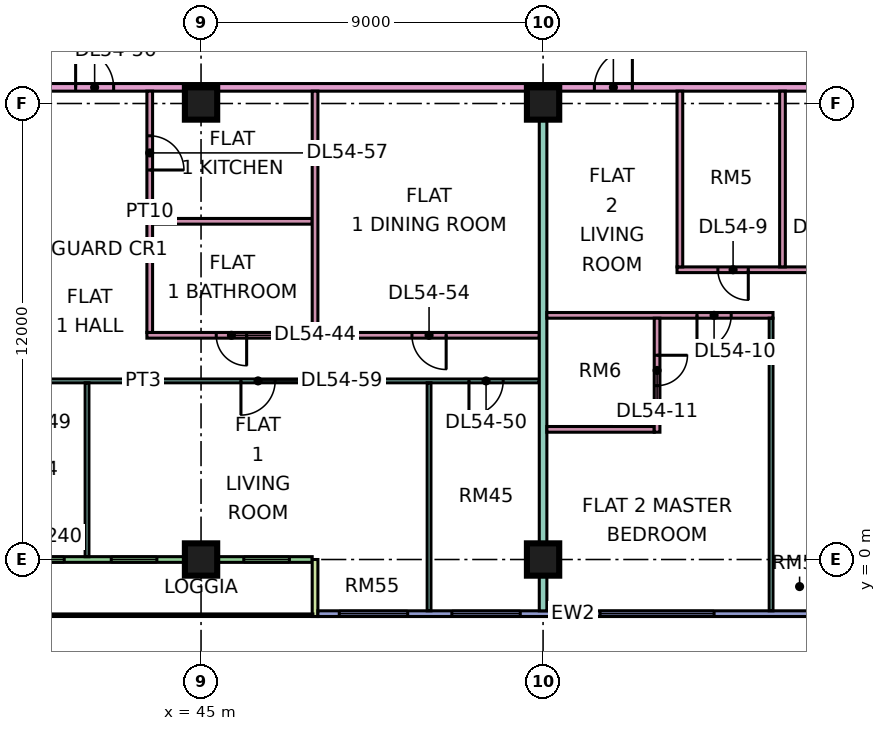
"""IFC4 building model, lengths in metres.
Left out: names, types, materials, properties, quantities, classifications, styles, units other than length and angle.
Written with IfcOpenShell. Run it as: python <this file> out.ifc"""

import sys

from ifc_helpers import new_model, si_unit, direction, frame, frame_2d, origin, origin_2d, place, context, subcontext, project, spatial, rectangle, extrude, element, fill, save


model = new_model("IFC4")
c1 = context("Model", 3, precision=1e-05, world=origin(), true_north=direction((0.0, 1.0)))
c2 = subcontext(c1, "Body", "Model", "MODEL_VIEW")
j1 = project(units=[si_unit("LENGTHUNIT", "METRE"), si_unit("PLANEANGLEUNIT", "RADIAN")], contexts=[c1])
p1 = place(None, origin())
s1 = spatial("IfcSite", under=j1, at=p1, CompositionType="ELEMENT")
p2 = place(p1, origin())
s2 = spatial("IfcBuilding", under=s1, at=p2, CompositionType="ELEMENT")
p3 = place(p2, frame((0.0, 0.0, 230.4)))
s3 = spatial("IfcBuildingStorey", under=s2, at=p3, CompositionType="ELEMENT", Elevation=230.4)
for number, where, z_axis, x_axis in (
    (1, (45.0, 0.0, 0.0), (0.0, 0.0, 1.0), (1.0, 0.0, 0.0)),
    (2, (45.0, 12.0, 0.0), (0.0, 0.0, 1.0), (1.0, 0.0, 0.0)),
    (3, (54.0, 0.0, 0.0), (0.0, 0.0, 1.0), (1.0, 0.0, 0.0)),
    (4, (54.0, 12.0, 0.0), (0.0, 0.0, 1.0), (1.0, 0.0, 0.0)),
):
    element("IfcColumn", number, at=place(p3, frame(where, z_axis=z_axis, x_axis=x_axis)), inside=s3, PredefinedType="COLUMN", context=c2, shape_type="SweptSolid", body=[
        extrude(rectangle(XDim=0.85, YDim=0.85, at=origin_2d()), origin(), (0.0, 0.0, 1.0), 3.75),
    ])
p4 = place(p3, frame((36.075, 0.0, 0.0), z_axis=(0.0, 0.0, 1.0), x_axis=(1.0, 0.0, 0.0)))
e5 = element("IfcWall", 5, at=p4, inside=s3, PredefinedType="SOLIDWALL", context=c2, shape_type="SweptSolid", body=[
    extrude(rectangle(XDim=11.85, YDim=0.15, at=frame_2d((5.925, 0.0))), origin(), (0.0, 0.0, 1.0), 3.35),
])
p5 = place(p4, frame((1.087, 0.0, 0.0)))
e6 = element("IfcOpeningElement", 6, at=p5, cuts=e5, PredefinedType="OPENING", context=c2, shape_type="SweptSolid", body=[
    extrude(rectangle(XDim=1.2, YDim=2.4, at=frame_2d((0.6, 1.2))), frame((0.0, 0.085, 0.0), z_axis=(0.0, -1.0, 0.0), x_axis=(1.0, 0.0, 0.0)), (0.0, 0.0, 1.0), 0.17),
])
p6 = place(p4, frame((3.525, 0.0, 0.45)))
e7 = element("IfcOpeningElement", 7, at=p6, cuts=e5, PredefinedType="OPENING", context=c2, shape_type="SweptSolid", body=[
    extrude(rectangle(XDim=1.8, YDim=2.4, at=frame_2d((0.9, 1.2))), frame((0.0, 0.085, 0.0), z_axis=(0.0, -1.0, 0.0), x_axis=(1.0, 0.0, 0.0)), (0.0, 0.0, 1.0), 0.17),
])
p7 = place(p4, frame((6.562, 0.0, 0.45)))
e8 = element("IfcOpeningElement", 8, at=p7, cuts=e5, PredefinedType="OPENING", context=c2, shape_type="SweptSolid", body=[
    extrude(rectangle(XDim=1.2, YDim=2.4, at=frame_2d((0.6, 1.2))), frame((0.0, 0.085, 0.0), z_axis=(0.0, -1.0, 0.0), x_axis=(1.0, 0.0, 0.0)), (0.0, 0.0, 1.0), 0.17),
])
p8 = place(p4, frame((10.05, 0.0, 0.45)))
e9 = element("IfcOpeningElement", 9, at=p8, cuts=e5, PredefinedType="OPENING", context=c2, shape_type="SweptSolid", body=[
    extrude(rectangle(XDim=1.2, YDim=2.4, at=frame_2d((0.6, 1.2))), frame((0.0, 0.085, 0.0), z_axis=(0.0, -1.0, 0.0), x_axis=(1.0, 0.0, 0.0)), (0.0, 0.0, 1.0), 0.17),
])
p9 = place(p3, frame((48.0, -1.5, 0.0), z_axis=(0.0, 0.0, 1.0), x_axis=(0.0, 1.0, 0.0)))
e10 = element("IfcWall", 10, at=p9, inside=s3, PredefinedType="SOLIDWALL", context=c2, shape_type="SweptSolid", body=[
    extrude(rectangle(XDim=1.5, YDim=0.15, at=frame_2d((0.75, 0.0))), origin(), (0.0, 0.0, 1.0), 3.35),
])
p10 = place(p3, frame((48.075, -1.425, 0.0), z_axis=(0.0, 0.0, 1.0), x_axis=(1.0, 0.0, 0.0)))
e11 = element("IfcWall", 11, at=p10, inside=s3, PredefinedType="SOLIDWALL", context=c2, shape_type="SweptSolid", body=[
    extrude(rectangle(XDim=13.425, YDim=0.15, at=frame_2d((6.712, 0.0))), origin(), (0.0, 0.0, 1.0), 3.35),
])
p11 = place(p10, frame((0.562, 0.0, 0.45)))
e12 = element("IfcOpeningElement", 12, at=p11, cuts=e11, PredefinedType="OPENING", context=c2, shape_type="SweptSolid", body=[
    extrude(rectangle(XDim=1.8, YDim=2.4, at=frame_2d((0.9, 1.2))), frame((0.0, 0.085, 0.0), z_axis=(0.0, -1.0, 0.0), x_axis=(1.0, 0.0, 0.0)), (0.0, 0.0, 1.0), 0.17),
])
p12 = place(p10, frame((3.525, 0.0, 0.45)))
e13 = element("IfcOpeningElement", 13, at=p12, cuts=e11, PredefinedType="OPENING", context=c2, shape_type="SweptSolid", body=[
    extrude(rectangle(XDim=1.8, YDim=2.4, at=frame_2d((0.9, 1.2))), frame((0.0, 0.085, 0.0), z_axis=(0.0, -1.0, 0.0), x_axis=(1.0, 0.0, 0.0)), (0.0, 0.0, 1.0), 0.17),
])
p13 = place(p10, frame((7.425, 0.0, 0.45)))
e14 = element("IfcOpeningElement", 14, at=p13, cuts=e11, PredefinedType="OPENING", context=c2, shape_type="SweptSolid", body=[
    extrude(rectangle(XDim=3.0, YDim=2.4, at=frame_2d((1.5, 1.2))), frame((0.0, 0.085, 0.0), z_axis=(0.0, -1.0, 0.0), x_axis=(1.0, 0.0, 0.0)), (0.0, 0.0, 1.0), 0.17),
])
p14 = place(p3, frame((33.05, 4.7, 0.0), z_axis=(0.0, 0.0, 1.0), x_axis=(1.0, 0.0, 0.0)))
e15 = element("IfcWall", 15, at=p14, inside=s3, PredefinedType="PARTITIONING", context=c2, shape_type="SweptSolid", body=[
    extrude(rectangle(XDim=20.85, YDim=0.1, at=frame_2d((10.425, 0.0))), origin(), (0.0, 0.0, 1.0), 3.35),
])
p15 = place(p14, frame((1.0, 0.0, 0.0)))
e16 = element("IfcOpeningElement", 16, at=p15, cuts=e15, PredefinedType="OPENING", context=c2, shape_type="SweptSolid", body=[
    extrude(rectangle(XDim=0.9, YDim=2.1, at=frame_2d((0.45, 1.05))), frame((0.0, 0.06, 0.0), z_axis=(0.0, -1.0, 0.0), x_axis=(1.0, 0.0, 0.0)), (0.0, 0.0, 1.0), 0.12),
])
p16 = place(p14, frame((4.0, 0.0, 0.0)))
e17 = element("IfcOpeningElement", 17, at=p16, cuts=e15, PredefinedType="OPENING", context=c2, shape_type="SweptSolid", body=[
    extrude(rectangle(XDim=0.9, YDim=2.1, at=frame_2d((0.45, 1.05))), frame((0.0, 0.06, 0.0), z_axis=(0.0, -1.0, 0.0), x_axis=(1.0, 0.0, 0.0)), (0.0, 0.0, 1.0), 0.12),
])
p17 = place(p14, frame((7.0, 0.0, 0.0)))
e18 = element("IfcOpeningElement", 18, at=p17, cuts=e15, PredefinedType="OPENING", context=c2, shape_type="SweptSolid", body=[
    extrude(rectangle(XDim=0.9, YDim=2.1, at=frame_2d((0.45, 1.05))), frame((0.0, 0.06, 0.0), z_axis=(0.0, -1.0, 0.0), x_axis=(1.0, 0.0, 0.0)), (0.0, 0.0, 1.0), 0.12),
])
p18 = place(p14, frame((19.0, 0.0, 0.0)))
e19 = element("IfcOpeningElement", 19, at=p18, cuts=e15, PredefinedType="OPENING", context=c2, shape_type="SweptSolid", body=[
    extrude(rectangle(XDim=0.9, YDim=2.1, at=frame_2d((0.45, 1.05))), frame((0.0, 0.06, 0.0), z_axis=(0.0, -1.0, 0.0), x_axis=(1.0, 0.0, 0.0)), (0.0, 0.0, 1.0), 0.12),
])
p19 = place(p14, frame((13.0, 0.0, 0.0)))
e20 = element("IfcOpeningElement", 20, at=p19, cuts=e15, PredefinedType="OPENING", context=c2, shape_type="SweptSolid", body=[
    extrude(rectangle(XDim=0.9, YDim=2.1, at=frame_2d((0.45, 1.05))), frame((0.0, 0.06, 0.0), z_axis=(0.0, -1.0, 0.0), x_axis=(1.0, 0.0, 0.0)), (0.0, 0.0, 1.0), 0.12),
])
p20 = place(p3, frame((40.65, 12.425, 0.0), z_axis=(0.0, 0.0, 1.0), x_axis=(1.0, 0.0, 0.0)))
e21 = element("IfcWall", 21, at=p20, inside=s3, PredefinedType="PARTITIONING", context=c2, shape_type="SweptSolid", body=[
    extrude(rectangle(XDim=22.276, YDim=0.2, at=frame_2d((11.138, 0.0))), origin(), (0.0, 0.0, 1.0), 3.35),
])
p21 = place(p20, frame((14.7, 0.0, 0.0)))
e22 = element("IfcOpeningElement", 22, at=p21, cuts=e21, PredefinedType="OPENING", context=c2, shape_type="SweptSolid", body=[
    extrude(rectangle(XDim=1.0, YDim=2.1, at=frame_2d((0.5, 1.05))), frame((0.0, 0.11, 0.0), z_axis=(0.0, -1.0, 0.0), x_axis=(1.0, 0.0, 0.0)), (0.0, 0.0, 1.0), 0.22),
])
p22 = place(p20, frame((1.05, 0.0, 0.0)))
e23 = element("IfcOpeningElement", 23, at=p22, cuts=e21, PredefinedType="OPENING", context=c2, shape_type="SweptSolid", body=[
    extrude(rectangle(XDim=1.0, YDim=2.1, at=frame_2d((0.5, 1.05))), frame((0.0, 0.11, 0.0), z_axis=(0.0, -1.0, 0.0), x_axis=(1.0, 0.0, 0.0)), (0.0, 0.0, 1.0), 0.22),
])
p23 = place(p3, frame((42.0, 0.074, 0.0), z_axis=(0.0, 0.0, 1.0), x_axis=(0.0, 1.0, 0.0)))
e24 = element("IfcWall", 24, at=p23, inside=s3, PredefinedType="PARTITIONING", context=c2, shape_type="SweptSolid", body=[
    extrude(rectangle(XDim=4.576, YDim=0.1, at=frame_2d((2.288, 0.0))), origin(), (0.0, 0.0, 1.0), 3.35),
])
p24 = place(p3, frame((43.575, 5.9, 0.0), z_axis=(0.0, 0.0, 1.0), x_axis=(1.0, 0.0, 0.0)))
e25 = element("IfcWall", 25, at=p24, inside=s3, PredefinedType="PARTITIONING", context=c2, shape_type="SweptSolid", body=[
    extrude(rectangle(XDim=10.325, YDim=0.15, at=frame_2d((5.163, 0.0))), origin(), (0.0, 0.0, 1.0), 3.35),
])
p25 = place(p24, frame((1.825, 0.0, 0.0)))
e26 = element("IfcOpeningElement", 26, at=p25, cuts=e25, PredefinedType="OPENING", context=c2, shape_type="SweptSolid", body=[
    extrude(rectangle(XDim=0.8, YDim=2.1, at=frame_2d((0.4, 1.05))), frame((0.0, 0.085, 0.0), z_axis=(0.0, -1.0, 0.0), x_axis=(1.0, 0.0, 0.0)), (0.0, 0.0, 1.0), 0.17),
])
p26 = place(p24, frame((6.975, 0.0, 0.0)))
e27 = element("IfcOpeningElement", 27, at=p26, cuts=e25, PredefinedType="OPENING", context=c2, shape_type="SweptSolid", body=[
    extrude(rectangle(XDim=0.9, YDim=2.1, at=frame_2d((0.45, 1.05))), frame((0.0, 0.085, 0.0), z_axis=(0.0, -1.0, 0.0), x_axis=(1.0, 0.0, 0.0)), (0.0, 0.0, 1.0), 0.17),
])
p27 = place(p3, frame((43.65, 5.975, 0.0), z_axis=(0.0, 0.0, 1.0), x_axis=(0.0, 1.0, 0.0)))
e28 = element("IfcWall", 28, at=p27, inside=s3, PredefinedType="PARTITIONING", context=c2, shape_type="SweptSolid", body=[
    extrude(rectangle(XDim=6.35, YDim=0.15, at=frame_2d((3.175, 0.0))), origin(), (0.0, 0.0, 1.0), 3.35),
])
p28 = place(p27, frame((4.275, 0.0, 0.0)))
e29 = element("IfcOpeningElement", 29, at=p28, cuts=e28, PredefinedType="OPENING", context=c2, shape_type="SweptSolid", body=[
    extrude(rectangle(XDim=0.9, YDim=2.1, at=frame_2d((0.45, 1.05))), frame((0.0, 0.085, 0.0), z_axis=(0.0, -1.0, 0.0), x_axis=(1.0, 0.0, 0.0)), (0.0, 0.0, 1.0), 0.17),
])
p29 = place(p3, frame((43.725, 8.9, 0.0), z_axis=(0.0, 0.0, 1.0), x_axis=(1.0, 0.0, 0.0)))
e30 = element("IfcWall", 30, at=p29, inside=s3, PredefinedType="PARTITIONING", context=c2, shape_type="SweptSolid", body=[
    extrude(rectangle(XDim=4.2, YDim=0.15, at=frame_2d((2.1, 0.0))), origin(), (0.0, 0.0, 1.0), 3.35),
])
p30 = place(p3, frame((48.0, 5.975, 0.0), z_axis=(0.0, 0.0, 1.0), x_axis=(0.0, 1.0, 0.0)))
e31 = element("IfcWall", 31, at=p30, inside=s3, PredefinedType="PARTITIONING", context=c2, shape_type="SweptSolid", body=[
    extrude(rectangle(XDim=6.35, YDim=0.15, at=frame_2d((3.175, 0.0))), origin(), (0.0, 0.0, 1.0), 3.35),
])
p31 = place(p3, frame((51.0, -1.35, 0.0), z_axis=(0.0, 0.0, 1.0), x_axis=(0.0, 1.0, 0.0)))
e32 = element("IfcWall", 32, at=p31, inside=s3, PredefinedType="PARTITIONING", context=c2, shape_type="SweptSolid", body=[
    extrude(rectangle(XDim=6.0, YDim=0.1, at=frame_2d((3.0, 0.0))), origin(), (0.0, 0.0, 1.0), 3.35),
])
p32 = place(p3, frame((54.0, -1.351, 0.0), z_axis=(0.0, 0.0, 1.0), x_axis=(0.0, 1.0, 0.0)))
e33 = element("IfcWall", 33, at=p32, inside=s3, PredefinedType="PARTITIONING", context=c2, shape_type="SweptSolid", body=[
    extrude(rectangle(XDim=13.676, YDim=0.2, at=frame_2d((6.838, 0.0))), origin(), (0.0, 0.0, 1.0), 3.35),
])
p33 = place(p3, frame((54.1, 3.425, 0.0), z_axis=(0.0, 0.0, 1.0), x_axis=(1.0, 0.0, 0.0)))
e34 = element("IfcWall", 34, at=p33, inside=s3, PredefinedType="PARTITIONING", context=c2, shape_type="SweptSolid", body=[
    extrude(rectangle(XDim=2.825, YDim=0.15, at=frame_2d((1.413, 0.0))), origin(), (0.0, 0.0, 1.0), 3.35),
])
p34 = place(p3, frame((54.1, 6.425, 0.0), z_axis=(0.0, 0.0, 1.0), x_axis=(1.0, 0.0, 0.0)))
e35 = element("IfcWall", 35, at=p34, inside=s3, PredefinedType="PARTITIONING", context=c2, shape_type="SweptSolid", body=[
    extrude(rectangle(XDim=5.95, YDim=0.15, at=frame_2d((2.975, 0.0))), origin(), (0.0, 0.0, 1.0), 3.35),
])
p35 = place(p34, frame((3.95, 0.0, 0.0)))
e36 = element("IfcOpeningElement", 36, at=p35, cuts=e35, PredefinedType="OPENING", context=c2, shape_type="SweptSolid", body=[
    extrude(rectangle(XDim=0.9, YDim=2.1, at=frame_2d((0.45, 1.05))), frame((0.0, 0.085, 0.0), z_axis=(0.0, -1.0, 0.0), x_axis=(1.0, 0.0, 0.0)), (0.0, 0.0, 1.0), 0.17),
])
p36 = place(p3, frame((57.0, 3.35, 0.0), z_axis=(0.0, 0.0, 1.0), x_axis=(0.0, 1.0, 0.0)))
e37 = element("IfcWall", 37, at=p36, inside=s3, PredefinedType="PARTITIONING", context=c2, shape_type="SweptSolid", body=[
    extrude(rectangle(XDim=3.0, YDim=0.15, at=frame_2d((1.5, 0.0))), origin(), (0.0, 0.0, 1.0), 3.35),
])
p37 = place(p36, frame((1.225, 0.0, 0.0)))
e38 = element("IfcOpeningElement", 38, at=p37, cuts=e37, PredefinedType="OPENING", context=c2, shape_type="SweptSolid", body=[
    extrude(rectangle(XDim=0.8, YDim=2.1, at=frame_2d((0.4, 1.05))), frame((0.0, 0.085, 0.0), z_axis=(0.0, -1.0, 0.0), x_axis=(1.0, 0.0, 0.0)), (0.0, 0.0, 1.0), 0.17),
])
p38 = place(p3, frame((57.525, 7.625, 0.0), z_axis=(0.0, 0.0, 1.0), x_axis=(1.0, 0.0, 0.0)))
e39 = element("IfcWall", 39, at=p38, inside=s3, PredefinedType="PARTITIONING", context=c2, shape_type="SweptSolid", body=[
    extrude(rectangle(XDim=6.825, YDim=0.15, at=frame_2d((3.413, 0.0))), origin(), (0.0, 0.0, 1.0), 3.35),
])
p39 = place(p38, frame((1.075, 0.0, 0.0)))
e40 = element("IfcOpeningElement", 40, at=p39, cuts=e39, PredefinedType="OPENING", context=c2, shape_type="SweptSolid", body=[
    extrude(rectangle(XDim=0.8, YDim=2.1, at=frame_2d((0.4, 1.05))), frame((0.0, 0.085, 0.0), z_axis=(0.0, -1.0, 0.0), x_axis=(1.0, 0.0, 0.0)), (0.0, 0.0, 1.0), 0.17),
])
p40 = place(p38, frame((3.675, 0.0, 0.0)))
e41 = element("IfcOpeningElement", 41, at=p40, cuts=e39, PredefinedType="OPENING", context=c2, shape_type="SweptSolid", body=[
    extrude(rectangle(XDim=0.9, YDim=2.1, at=frame_2d((0.45, 1.05))), frame((0.0, 0.085, 0.0), z_axis=(0.0, -1.0, 0.0), x_axis=(1.0, 0.0, 0.0)), (0.0, 0.0, 1.0), 0.17),
])
p41 = place(p3, frame((57.6, 7.7, 0.0), z_axis=(0.0, 0.0, 1.0), x_axis=(0.0, 1.0, 0.0)))
e42 = element("IfcWall", 42, at=p41, inside=s3, PredefinedType="PARTITIONING", context=c2, shape_type="SweptSolid", body=[
    extrude(rectangle(XDim=4.625, YDim=0.15, at=frame_2d((2.312, 0.0))), origin(), (0.0, 0.0, 1.0), 3.35),
])
p42 = place(p3, frame((60.0, -1.35, 0.0), z_axis=(0.0, 0.0, 1.0), x_axis=(0.0, 1.0, 0.0)))
e43 = element("IfcWall", 43, at=p42, inside=s3, PredefinedType="PARTITIONING", context=c2, shape_type="SweptSolid", body=[
    extrude(rectangle(XDim=7.7, YDim=0.1, at=frame_2d((3.85, 0.0))), origin(), (0.0, 0.0, 1.0), 3.35),
])
p43 = place(p3, frame((60.3, 7.7, 0.0), z_axis=(0.0, 0.0, 1.0), x_axis=(0.0, 1.0, 0.0)))
e44 = element("IfcWall", 44, at=p43, inside=s3, PredefinedType="PARTITIONING", context=c2, shape_type="SweptSolid", body=[
    extrude(rectangle(XDim=4.625, YDim=0.15, at=frame_2d((2.312, 0.0))), origin(), (0.0, 0.0, 1.0), 3.35),
])
p44 = place(p6, origin())
e45 = element("IfcWindow", 45, at=p44, inside=s3, PartitioningType="SINGLE_PANEL", PredefinedType="WINDOW", context=c2, shape_type="SweptSolid", body=[
    extrude(rectangle(XDim=1.8, YDim=2.4, at=frame_2d((0.9, 1.2))), frame((0.0, 0.03, 0.0), z_axis=(0.0, -1.0, 0.0), x_axis=(1.0, 0.0, 0.0)), (0.0, 0.0, 1.0), 0.06),
])
fill(e7, e45)
p45 = place(p7, origin())
e46 = element("IfcWindow", 46, at=p45, inside=s3, PartitioningType="SINGLE_PANEL", PredefinedType="WINDOW", context=c2, shape_type="SweptSolid", body=[
    extrude(rectangle(XDim=1.2, YDim=2.4, at=frame_2d((0.6, 1.2))), frame((0.0, 0.03, 0.0), z_axis=(0.0, -1.0, 0.0), x_axis=(1.0, 0.0, 0.0)), (0.0, 0.0, 1.0), 0.06),
])
fill(e8, e46)
p46 = place(p8, origin())
e47 = element("IfcWindow", 47, at=p46, inside=s3, PartitioningType="SINGLE_PANEL", PredefinedType="WINDOW", context=c2, shape_type="SweptSolid", body=[
    extrude(rectangle(XDim=1.2, YDim=2.4, at=frame_2d((0.6, 1.2))), frame((0.0, 0.03, 0.0), z_axis=(0.0, -1.0, 0.0), x_axis=(1.0, 0.0, 0.0)), (0.0, 0.0, 1.0), 0.06),
])
fill(e9, e47)
p47 = place(p11, origin())
e48 = element("IfcWindow", 48, at=p47, inside=s3, PartitioningType="SINGLE_PANEL", PredefinedType="WINDOW", context=c2, shape_type="SweptSolid", body=[
    extrude(rectangle(XDim=1.8, YDim=2.4, at=frame_2d((0.9, 1.2))), frame((0.0, 0.03, 0.0), z_axis=(0.0, -1.0, 0.0), x_axis=(1.0, 0.0, 0.0)), (0.0, 0.0, 1.0), 0.06),
])
fill(e12, e48)
p48 = place(p12, origin())
e49 = element("IfcWindow", 49, at=p48, inside=s3, PartitioningType="SINGLE_PANEL", PredefinedType="WINDOW", context=c2, shape_type="SweptSolid", body=[
    extrude(rectangle(XDim=1.8, YDim=2.4, at=frame_2d((0.9, 1.2))), frame((0.0, 0.03, 0.0), z_axis=(0.0, -1.0, 0.0), x_axis=(1.0, 0.0, 0.0)), (0.0, 0.0, 1.0), 0.06),
])
fill(e13, e49)
p49 = place(p13, origin())
e50 = element("IfcWindow", 50, at=p49, inside=s3, PartitioningType="SINGLE_PANEL", PredefinedType="WINDOW", context=c2, shape_type="SweptSolid", body=[
    extrude(rectangle(XDim=3.0, YDim=2.4, at=frame_2d((1.5, 1.2))), frame((0.0, 0.03, 0.0), z_axis=(0.0, -1.0, 0.0), x_axis=(1.0, 0.0, 0.0)), (0.0, 0.0, 1.0), 0.06),
])
fill(e14, e50)
p50 = place(p39, origin())
e51 = element("IfcDoor", 51, at=p50, inside=s3, OperationType="SINGLE_SWING_RIGHT", PredefinedType="DOOR", context=c2, shape_type="SweptSolid", body=[
    extrude(rectangle(XDim=0.8, YDim=2.1, at=frame_2d((0.4, 1.05))), frame((0.0, 0.025, 0.0), z_axis=(0.0, -1.0, 0.0), x_axis=(1.0, 0.0, 0.0)), (0.0, 0.0, 1.0), 0.05),
])
fill(e40, e51)
p51 = place(p35, frame((0.9, 0.0, 0.0), z_axis=(0.0, 0.0, 1.0), x_axis=(-1.0, 0.0, 0.0)))
e52 = element("IfcDoor", 52, at=p51, inside=s3, OperationType="SINGLE_SWING_LEFT", PredefinedType="DOOR", context=c2, shape_type="SweptSolid", body=[
    extrude(rectangle(XDim=0.9, YDim=2.1, at=frame_2d((0.45, 1.05))), frame((0.0, 0.025, 0.0), z_axis=(0.0, -1.0, 0.0), x_axis=(1.0, 0.0, 0.0)), (0.0, 0.0, 1.0), 0.05),
])
fill(e36, e52)
p52 = place(p37, origin())
e53 = element("IfcDoor", 53, at=p52, inside=s3, OperationType="SINGLE_SWING_RIGHT", PredefinedType="DOOR", context=c2, shape_type="SweptSolid", body=[
    extrude(rectangle(XDim=0.8, YDim=2.1, at=frame_2d((0.4, 1.05))), frame((0.0, 0.025, 0.0), z_axis=(0.0, -1.0, 0.0), x_axis=(1.0, 0.0, 0.0)), (0.0, 0.0, 1.0), 0.05),
])
fill(e38, e53)
p53 = place(p21, frame((1.0, 0.0, 0.0), z_axis=(0.0, 0.0, 1.0), x_axis=(-1.0, 0.0, 0.0)))
e54 = element("IfcDoor", 54, at=p53, inside=s3, OperationType="SINGLE_SWING_RIGHT", PredefinedType="DOOR", context=c2, shape_type="SweptSolid", body=[
    extrude(rectangle(XDim=1.0, YDim=2.1, at=frame_2d((0.5, 1.05))), frame((0.0, 0.025, 0.0), z_axis=(0.0, -1.0, 0.0), x_axis=(1.0, 0.0, 0.0)), (0.0, 0.0, 1.0), 0.05),
])
fill(e22, e54)
p54 = place(p25, origin())
e55 = element("IfcDoor", 55, at=p54, inside=s3, OperationType="SINGLE_SWING_RIGHT", PredefinedType="DOOR", context=c2, shape_type="SweptSolid", body=[
    extrude(rectangle(XDim=0.8, YDim=2.1, at=frame_2d((0.4, 1.05))), frame((0.0, 0.025, 0.0), z_axis=(0.0, -1.0, 0.0), x_axis=(1.0, 0.0, 0.0)), (0.0, 0.0, 1.0), 0.05),
])
fill(e26, e55)
p55 = place(p18, frame((0.9, 0.0, 0.0), z_axis=(0.0, 0.0, 1.0), x_axis=(-1.0, 0.0, 0.0)))
e56 = element("IfcDoor", 56, at=p55, inside=s3, OperationType="SINGLE_SWING_LEFT", PredefinedType="DOOR", context=c2, shape_type="SweptSolid", body=[
    extrude(rectangle(XDim=0.9, YDim=2.1, at=frame_2d((0.45, 1.05))), frame((0.0, 0.025, 0.0), z_axis=(0.0, -1.0, 0.0), x_axis=(1.0, 0.0, 0.0)), (0.0, 0.0, 1.0), 0.05),
])
fill(e19, e56)
p56 = place(p26, origin())
e57 = element("IfcDoor", 57, at=p56, inside=s3, OperationType="SINGLE_SWING_RIGHT", PredefinedType="DOOR", context=c2, shape_type="SweptSolid", body=[
    extrude(rectangle(XDim=0.9, YDim=2.1, at=frame_2d((0.45, 1.05))), frame((0.0, 0.025, 0.0), z_axis=(0.0, -1.0, 0.0), x_axis=(1.0, 0.0, 0.0)), (0.0, 0.0, 1.0), 0.05),
])
fill(e27, e57)
p57 = place(p22, origin())
e58 = element("IfcDoor", 58, at=p57, inside=s3, OperationType="SINGLE_SWING_LEFT", PredefinedType="DOOR", context=c2, shape_type="SweptSolid", body=[
    extrude(rectangle(XDim=1.0, YDim=2.1, at=frame_2d((0.5, 1.05))), frame((0.0, 0.025, 0.0), z_axis=(0.0, -1.0, 0.0), x_axis=(1.0, 0.0, 0.0)), (0.0, 0.0, 1.0), 0.05),
])
fill(e23, e58)
p58 = place(p28, frame((0.9, 0.0, 0.0), z_axis=(0.0, 0.0, 1.0), x_axis=(-1.0, 0.0, 0.0)))
e59 = element("IfcDoor", 59, at=p58, inside=s3, OperationType="SINGLE_SWING_LEFT", PredefinedType="DOOR", context=c2, shape_type="SweptSolid", body=[
    extrude(rectangle(XDim=0.9, YDim=2.1, at=frame_2d((0.45, 1.05))), frame((0.0, 0.025, 0.0), z_axis=(0.0, -1.0, 0.0), x_axis=(1.0, 0.0, 0.0)), (0.0, 0.0, 1.0), 0.05),
])
fill(e29, e59)
p59 = place(p19, frame((0.9, 0.0, 0.0), z_axis=(0.0, 0.0, 1.0), x_axis=(-1.0, 0.0, 0.0)))
e60 = element("IfcDoor", 60, at=p59, inside=s3, OperationType="SINGLE_SWING_LEFT", PredefinedType="DOOR", context=c2, shape_type="SweptSolid", body=[
    extrude(rectangle(XDim=0.9, YDim=2.1, at=frame_2d((0.45, 1.05))), frame((0.0, 0.025, 0.0), z_axis=(0.0, -1.0, 0.0), x_axis=(1.0, 0.0, 0.0)), (0.0, 0.0, 1.0), 0.05),
])
fill(e20, e60)
save(model, sys.argv[1])
